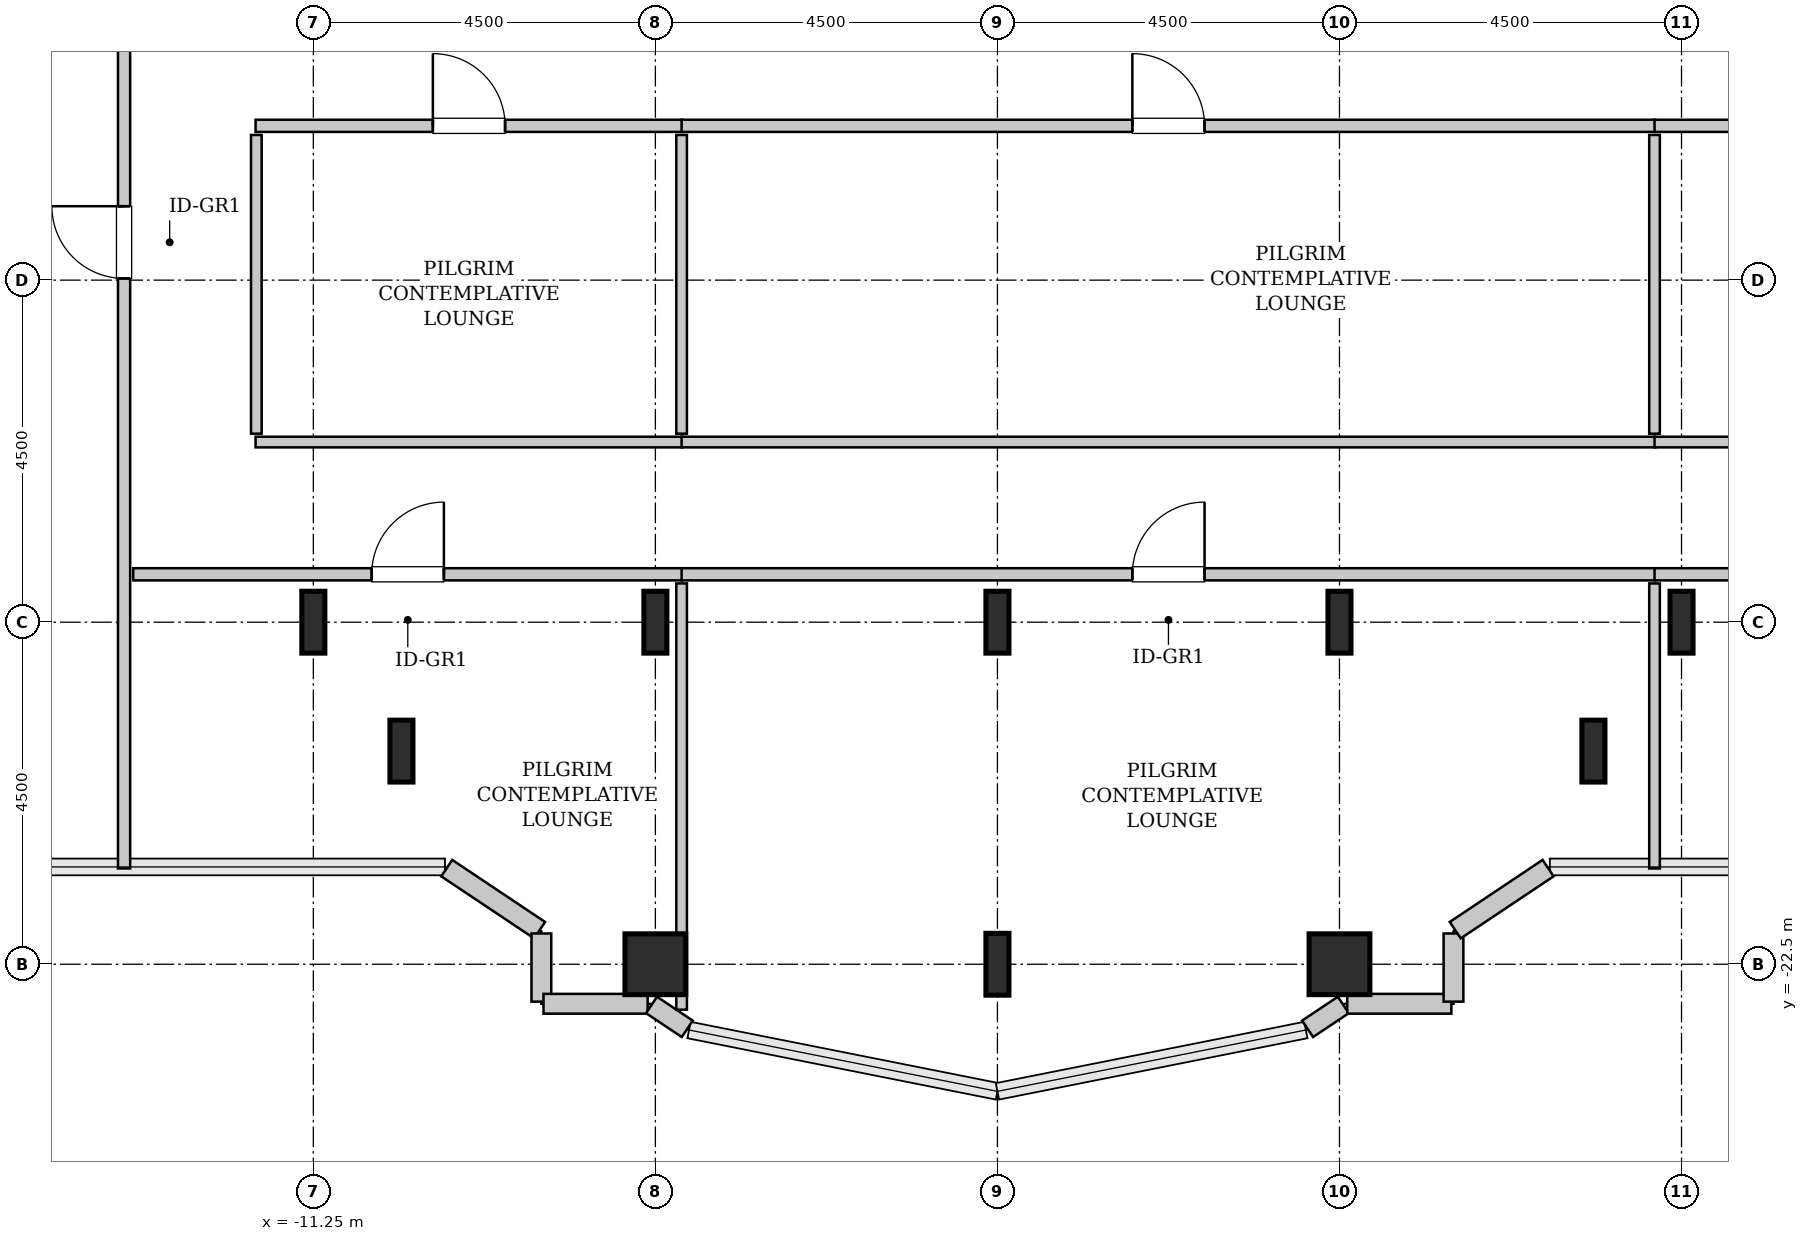
"""IFC4 building model, lengths in metres.
Left out: names, types, materials, properties, quantities, classifications, styles, units other than length and angle.
Written with IfcOpenShell. Run it as: python <this file> out.ifc"""

import sys

from ifc_helpers import new_model, si_unit, direction, frame, frame_2d, origin, origin_2d, place, context, subcontext, project, spatial, rectangle, hollow_rectangle, i_section, extrude, source, transform, mapped, element, fill, save


model = new_model("IFC4")
c1 = context("Model", 3, precision=1e-05, world=origin(), true_north=direction((0.0, 1.0)))
c2 = subcontext(c1, "Body", "Model", "MODEL_VIEW")
j1 = project(units=[si_unit("LENGTHUNIT", "METRE"), si_unit("PLANEANGLEUNIT", "RADIAN")], contexts=[c1])
p1 = place(None, origin())
s1 = spatial("IfcSite", under=j1, at=p1, CompositionType="ELEMENT")
p2 = place(p1, origin())
s2 = spatial("IfcBuilding", under=s1, at=p2, CompositionType="ELEMENT")
p3 = place(p2, frame((0.0, 0.0, 190.6)))
s3 = spatial("IfcBuildingStorey", under=s2, at=p3, CompositionType="ELEMENT", Elevation=190.6)
m1 = source(origin(), c2, "Body", "SweptSolid", [
    extrude(i_section(OverallWidth=0.303, OverallDepth=0.814, WebThickness=0.021, FlangeThickness=0.04, FilletRadius=0.03, at=origin_2d()), origin(), (0.0, 0.0, 1.0), 3.8),
])
for number, where, z_axis, x_axis in (
    (1, (-11.25, -18.0, 0.0), (0.0, 0.0, 1.0), (1.0, 0.0, 0.0)),
    (2, (-10.091, -19.696, 0.0), (0.0, 0.0, 1.0), (1.0, 0.0, 0.0)),
):
    element("IfcColumn", number, at=place(p3, frame(where, z_axis=z_axis, x_axis=x_axis)), inside=s3, PredefinedType="COLUMN", context=c2, shape_type="MappedRepresentation", body=[
        mapped(m1, transform((0.0, 0.0, 0.0), x_axis=(1.0, 0.0, 0.0), y_axis=(0.0, 1.0, 0.0), z_axis=(0.0, 0.0, 1.0), scale=1.0)),
    ])
m2 = source(origin(), c2, "Body", "SweptSolid", [
    extrude(hollow_rectangle(XDim=0.8, YDim=0.8, WallThickness=0.04, InnerFilletRadius=0.04, OuterFilletRadius=0.08, at=origin_2d()), origin(), (0.0, 0.0, 1.0), 3.8),
])
p4 = place(p3, frame((-6.75, -22.5, 0.0), z_axis=(0.0, 0.0, 1.0), x_axis=(1.0, 0.0, 0.0)))
e3 = element("IfcColumn", 3, at=p4, inside=s3, PredefinedType="COLUMN", context=c2, shape_type="MappedRepresentation", body=[
    mapped(m2, transform((0.0, 0.0, 0.0), x_axis=(1.0, 0.0, 0.0), y_axis=(0.0, 1.0, 0.0), z_axis=(0.0, 0.0, 1.0), scale=1.0)),
])
for number, where, z_axis, x_axis in (
    (4, (-6.75, -18.0, 0.0), (0.0, 0.0, 1.0), (1.0, 0.0, 0.0)),
    (5, (-2.25, -22.5, 0.0), (0.0, 0.0, 1.0), (1.0, 0.0, 0.0)),
    (6, (-2.25, -18.0, 0.0), (0.0, 0.0, 1.0), (1.0, 0.0, 0.0)),
):
    element("IfcColumn", number, at=place(p3, frame(where, z_axis=z_axis, x_axis=x_axis)), inside=s3, PredefinedType="COLUMN", context=c2, shape_type="MappedRepresentation", body=[
        mapped(m1, transform((0.0, 0.0, 0.0), x_axis=(1.0, 0.0, 0.0), y_axis=(0.0, 1.0, 0.0), z_axis=(0.0, 0.0, 1.0), scale=1.0)),
    ])
p5 = place(p3, frame((2.25, -22.5, 0.0), z_axis=(0.0, 0.0, 1.0), x_axis=(1.0, 0.0, 0.0)))
e7 = element("IfcColumn", 7, at=p5, inside=s3, PredefinedType="COLUMN", context=c2, shape_type="MappedRepresentation", body=[
    mapped(m2, transform((0.0, 0.0, 0.0), x_axis=(1.0, 0.0, 0.0), y_axis=(0.0, 1.0, 0.0), z_axis=(0.0, 0.0, 1.0), scale=1.0)),
])
for number, where, z_axis, x_axis in (
    (8, (2.25, -18.0, 0.0), (0.0, 0.0, 1.0), (1.0, 0.0, 0.0)),
    (9, (5.591, -19.696, 0.0), (0.0, 0.0, 1.0), (1.0, 0.0, 0.0)),
    (10, (6.75, -18.0, 0.0), (0.0, 0.0, 1.0), (1.0, 0.0, 0.0)),
):
    element("IfcColumn", number, at=place(p3, frame(where, z_axis=z_axis, x_axis=x_axis)), inside=s3, PredefinedType="COLUMN", context=c2, shape_type="MappedRepresentation", body=[
        mapped(m1, transform((0.0, 0.0, 0.0), x_axis=(1.0, 0.0, 0.0), y_axis=(0.0, 1.0, 0.0), z_axis=(0.0, 0.0, 1.0), scale=1.0)),
    ])
m3 = source(origin(), c2, "Body", "SweptSolid", [
    extrude(rectangle(XDim=1.469, YDim=0.26, at=frame_2d((0.734, 0.0))), origin(), (0.0, 0.0, 1.0), 3.55),
])
p6 = place(p3, frame((-9.495, -21.236, 0.0), z_axis=(0.0, 0.0, 1.0), x_axis=(0.831461760506, -0.555581983884, 0.0)))
e11 = element("IfcWall", 11, at=p6, inside=s3, PredefinedType="SOLIDWALL", context=c2, shape_type="MappedRepresentation", body=[
    mapped(m3, transform((0.0, 0.0, 0.0), x_axis=(1.0, 0.0, 0.0), y_axis=(0.0, 1.0, 0.0), z_axis=(0.0, 0.0, 1.0), scale=1.0)),
])
m4 = source(origin(), c2, "Body", "SweptSolid", [
    extrude(rectangle(XDim=0.897, YDim=0.26, at=frame_2d((0.448, 0.0))), origin(), (0.0, 0.0, 1.0), 3.55),
])
p7 = place(p3, frame((-8.25, -22.095, 0.0), z_axis=(0.0, 0.0, 1.0), x_axis=(0.0, -1.0, 0.0)))
e12 = element("IfcWall", 12, at=p7, inside=s3, PredefinedType="SOLIDWALL", context=c2, shape_type="MappedRepresentation", body=[
    mapped(m4, transform((0.0, 0.0, 0.0), x_axis=(1.0, 0.0, 0.0), y_axis=(0.0, 1.0, 0.0), z_axis=(0.0, 0.0, 1.0), scale=1.0)),
])
m5 = source(origin(), c2, "Body", "SweptSolid", [
    extrude(rectangle(XDim=1.37, YDim=0.26, at=frame_2d((0.685, 0.0))), origin(), (0.0, 0.0, 1.0), 3.55),
])
p8 = place(p3, frame((-8.222, -23.02, 0.0), z_axis=(0.0, 0.0, 1.0), x_axis=(1.0, 0.0, 0.0)))
e13 = element("IfcWall", 13, at=p8, inside=s3, PredefinedType="SOLIDWALL", context=c2, shape_type="MappedRepresentation", body=[
    mapped(m5, transform((0.0, 0.0, 0.0), x_axis=(1.0, 0.0, 0.0), y_axis=(0.0, 1.0, 0.0), z_axis=(0.0, 0.0, 1.0), scale=1.0)),
])
m6 = source(origin(), c2, "Body", "SweptSolid", [
    extrude(rectangle(XDim=0.565, YDim=0.26, at=frame_2d((0.283, 0.0))), origin(), (0.0, 0.0, 1.0), 3.55),
])
for number, where, z_axis, x_axis in (
    (14, (-6.801, -23.036, 0.0), (0.0, 0.0, 1.0), (0.832, -0.555, 0.0)),
    (15, (1.831, -23.35, 0.0), (0.0, 0.0, 1.0), (0.832, 0.555, 0.0)),
):
    element("IfcWall", number, at=place(p3, frame(where, z_axis=z_axis, x_axis=x_axis)), inside=s3, PredefinedType="SOLIDWALL", context=c2, shape_type="MappedRepresentation", body=[
        mapped(m6, transform((0.0, 0.0, 0.0), x_axis=(1.0, 0.0, 0.0), y_axis=(0.0, 1.0, 0.0), z_axis=(0.0, 0.0, 1.0), scale=1.0)),
    ])
p9 = place(p3, frame((2.352, -23.02, 0.0), z_axis=(0.0, 0.0, 1.0), x_axis=(1.0, 0.0, 0.0)))
e16 = element("IfcWall", 16, at=p9, inside=s3, PredefinedType="SOLIDWALL", context=c2, shape_type="MappedRepresentation", body=[
    mapped(m5, transform((0.0, 0.0, 0.0), x_axis=(1.0, 0.0, 0.0), y_axis=(0.0, 1.0, 0.0), z_axis=(0.0, 0.0, 1.0), scale=1.0)),
])
p10 = place(p3, frame((3.75, -22.992, 0.0), z_axis=(0.0, 0.0, 1.0), x_axis=(0.0, 1.0, 0.0)))
e17 = element("IfcWall", 17, at=p10, inside=s3, PredefinedType="SOLIDWALL", context=c2, shape_type="MappedRepresentation", body=[
    mapped(m4, transform((0.0, 0.0, 0.0), x_axis=(1.0, 0.0, 0.0), y_axis=(0.0, 1.0, 0.0), z_axis=(0.0, 0.0, 1.0), scale=1.0)),
])
p11 = place(p3, frame((3.773, -22.052, 0.0), z_axis=(0.0, 0.0, 1.0), x_axis=(0.831461760506, 0.555581983884, 0.0)))
e18 = element("IfcWall", 18, at=p11, inside=s3, PredefinedType="SOLIDWALL", context=c2, shape_type="MappedRepresentation", body=[
    mapped(m3, transform((0.0, 0.0, 0.0), x_axis=(1.0, 0.0, 0.0), y_axis=(0.0, 1.0, 0.0), z_axis=(0.0, 0.0, 1.0), scale=1.0)),
])
m7 = source(origin(), c2, "Body", "SweptSolid", [
    extrude(rectangle(XDim=12.645, YDim=0.16, at=frame_2d((6.323, 0.0))), origin(), (0.0, 0.0, 1.0), 3.535),
])
p12 = place(p3, frame((-13.74, -21.24, 0.0), z_axis=(0.0, 0.0, 1.0), x_axis=(0.0, 1.0, 0.0)))
e19 = element("IfcWall", 19, at=p12, inside=s3, PredefinedType="PARTITIONING", context=c2, shape_type="MappedRepresentation", body=[
    mapped(m7, transform((0.0, 0.0, 0.0), x_axis=(1.0, 0.0, 0.0), y_axis=(0.0, 1.0, 0.0), z_axis=(0.0, 0.0, 1.0), scale=1.0)),
])
p13 = place(p12, frame((7.762, 0.0, 0.0)))
e20 = element("IfcOpeningElement", 20, at=p13, cuts=e19, PredefinedType="OPENING", context=c2, shape_type="SweptSolid", body=[
    extrude(rectangle(XDim=0.95, YDim=2.1, at=frame_2d((0.475, 1.05))), frame((0.0, 0.09, 0.0), z_axis=(0.0, -1.0, 0.0), x_axis=(1.0, 0.0, 0.0)), (0.0, 0.0, 1.0), 0.18),
])
m8 = source(origin(), c2, "Body", "SweptSolid", [
    extrude(rectangle(XDim=7.225, YDim=0.16, at=frame_2d((3.613, 0.0))), origin(), (0.0, 0.0, 1.0), 3.535),
])
p14 = place(p3, frame((-13.62, -17.37, 0.0), z_axis=(0.0, 0.0, 1.0), x_axis=(1.0, 0.0, 0.0)))
e21 = element("IfcWall", 21, at=p14, inside=s3, PredefinedType="PARTITIONING", context=c2, shape_type="MappedRepresentation", body=[
    mapped(m8, transform((0.0, 0.0, 0.0), x_axis=(1.0, 0.0, 0.0), y_axis=(0.0, 1.0, 0.0), z_axis=(0.0, 0.0, 1.0), scale=1.0)),
])
p15 = place(p14, frame((3.137, 0.0, 0.0)))
e22 = element("IfcOpeningElement", 22, at=p15, cuts=e21, PredefinedType="OPENING", context=c2, shape_type="SweptSolid", body=[
    extrude(rectangle(XDim=0.95, YDim=2.1, at=frame_2d((0.475, 1.05))), frame((0.0, 0.09, 0.0), z_axis=(0.0, -1.0, 0.0), x_axis=(1.0, 0.0, 0.0)), (0.0, 0.0, 1.0), 0.18),
])
m9 = source(origin(), c2, "Body", "SweptSolid", [
    extrude(rectangle(XDim=5.608, YDim=0.14, at=frame_2d((2.804, 0.0))), origin(), (0.0, 0.0, 1.0), 2.875),
])
p16 = place(p3, frame((-6.405, -23.098, 0.0), z_axis=(0.0, 0.0, 1.0), x_axis=(0.0, 1.0, 0.0)))
e23 = element("IfcWall", 23, at=p16, inside=s3, PredefinedType="PARTITIONING", context=c2, shape_type="MappedRepresentation", body=[
    mapped(m9, transform((0.0, 0.0, 0.0), x_axis=(1.0, 0.0, 0.0), y_axis=(0.0, 1.0, 0.0), z_axis=(0.0, 0.0, 1.0), scale=1.0)),
])
m10 = source(origin(), c2, "Body", "SweptSolid", [
    extrude(rectangle(XDim=5.615, YDim=0.16, at=frame_2d((2.808, 0.0))), origin(), (0.0, 0.0, 1.0), 3.535),
])
p17 = place(p3, frame((-12.01, -11.47, 0.0), z_axis=(0.0, 0.0, 1.0), x_axis=(1.0, 0.0, 0.0)))
e24 = element("IfcWall", 24, at=p17, inside=s3, PredefinedType="PARTITIONING", context=c2, shape_type="MappedRepresentation", body=[
    mapped(m10, transform((0.0, 0.0, 0.0), x_axis=(1.0, 0.0, 0.0), y_axis=(0.0, 1.0, 0.0), z_axis=(0.0, 0.0, 1.0), scale=1.0)),
])
p18 = place(p17, frame((2.333, 0.0, 0.0)))
e25 = element("IfcOpeningElement", 25, at=p18, cuts=e24, PredefinedType="OPENING", context=c2, shape_type="SweptSolid", body=[
    extrude(rectangle(XDim=0.95, YDim=2.1, at=frame_2d((0.475, 1.05))), frame((0.0, 0.09, 0.0), z_axis=(0.0, -1.0, 0.0), x_axis=(1.0, 0.0, 0.0)), (0.0, 0.0, 1.0), 0.18),
])
m11 = source(origin(), c2, "Body", "SweptSolid", [
    extrude(rectangle(XDim=5.615, YDim=0.14, at=frame_2d((2.808, 0.0))), origin(), (0.0, 0.0, 1.0), 3.535),
])
p19 = place(p3, frame((-12.01, -15.63, 0.0), z_axis=(0.0, 0.0, 1.0), x_axis=(1.0, 0.0, 0.0)))
e26 = element("IfcWall", 26, at=p19, inside=s3, PredefinedType="PARTITIONING", context=c2, shape_type="MappedRepresentation", body=[
    mapped(m11, transform((0.0, 0.0, 0.0), x_axis=(1.0, 0.0, 0.0), y_axis=(0.0, 1.0, 0.0), z_axis=(0.0, 0.0, 1.0), scale=1.0)),
])
m12 = source(origin(), c2, "Body", "SweptSolid", [
    extrude(rectangle(XDim=3.93, YDim=0.14, at=frame_2d((1.965, 0.0))), origin(), (0.0, 0.0, 1.0), 3.535),
])
for number, where, z_axis, x_axis in (
    (27, (-12.0, -15.52, 0.0), (0.0, 0.0, 1.0), (0.0, 1.0, 0.0)),
    (28, (-6.405, -15.52, 0.0), (0.0, 0.0, 1.0), (0.0, 1.0, 0.0)),
):
    element("IfcWall", number, at=place(p3, frame(where, z_axis=z_axis, x_axis=x_axis)), inside=s3, PredefinedType="PARTITIONING", context=c2, shape_type="MappedRepresentation", body=[
        mapped(m12, transform((0.0, 0.0, 0.0), x_axis=(1.0, 0.0, 0.0), y_axis=(0.0, 1.0, 0.0), z_axis=(0.0, 0.0, 1.0), scale=1.0)),
    ])
m13 = source(origin(), c2, "Body", "SweptSolid", [
    extrude(rectangle(XDim=12.81, YDim=0.16, at=frame_2d((6.405, 0.0))), origin(), (0.0, 0.0, 1.0), 3.535),
])
p20 = place(p3, frame((-6.405, -17.37, 0.0), z_axis=(0.0, 0.0, 1.0), x_axis=(1.0, 0.0, 0.0)))
e29 = element("IfcWall", 29, at=p20, inside=s3, PredefinedType="PARTITIONING", context=c2, shape_type="MappedRepresentation", body=[
    mapped(m13, transform((0.0, 0.0, 0.0), x_axis=(1.0, 0.0, 0.0), y_axis=(0.0, 1.0, 0.0), z_axis=(0.0, 0.0, 1.0), scale=1.0)),
])
p21 = place(p20, frame((5.93, 0.0, 0.0)))
e30 = element("IfcOpeningElement", 30, at=p21, cuts=e29, PredefinedType="OPENING", context=c2, shape_type="SweptSolid", body=[
    extrude(rectangle(XDim=0.95, YDim=2.1, at=frame_2d((0.475, 1.05))), frame((0.0, 0.09, 0.0), z_axis=(0.0, -1.0, 0.0), x_axis=(1.0, 0.0, 0.0)), (0.0, 0.0, 1.0), 0.18),
])
m14 = source(origin(), c2, "Body", "SweptSolid", [
    extrude(rectangle(XDim=3.75, YDim=0.14, at=frame_2d((1.875, 0.0))), origin(), (0.0, 0.0, 1.0), 3.535),
])
p22 = place(p3, frame((6.395, -21.24, 0.0), z_axis=(0.0, 0.0, 1.0), x_axis=(0.0, 1.0, 0.0)))
e31 = element("IfcWall", 31, at=p22, inside=s3, PredefinedType="PARTITIONING", context=c2, shape_type="MappedRepresentation", body=[
    mapped(m14, transform((0.0, 0.0, 0.0), x_axis=(1.0, 0.0, 0.0), y_axis=(0.0, 1.0, 0.0), z_axis=(0.0, 0.0, 1.0), scale=1.0)),
])
p23 = place(p3, frame((-6.405, -11.47, 0.0), z_axis=(0.0, 0.0, 1.0), x_axis=(1.0, 0.0, 0.0)))
e32 = element("IfcWall", 32, at=p23, inside=s3, PredefinedType="PARTITIONING", context=c2, shape_type="MappedRepresentation", body=[
    mapped(m13, transform((0.0, 0.0, 0.0), x_axis=(1.0, 0.0, 0.0), y_axis=(0.0, 1.0, 0.0), z_axis=(0.0, 0.0, 1.0), scale=1.0)),
])
p24 = place(p23, frame((5.93, 0.0, 0.0)))
e33 = element("IfcOpeningElement", 33, at=p24, cuts=e32, PredefinedType="OPENING", context=c2, shape_type="SweptSolid", body=[
    extrude(rectangle(XDim=0.95, YDim=2.1, at=frame_2d((0.475, 1.05))), frame((0.0, 0.09, 0.0), z_axis=(0.0, -1.0, 0.0), x_axis=(1.0, 0.0, 0.0)), (0.0, 0.0, 1.0), 0.18),
])
m15 = source(origin(), c2, "Body", "SweptSolid", [
    extrude(rectangle(XDim=12.81, YDim=0.14, at=frame_2d((6.405, 0.0))), origin(), (0.0, 0.0, 1.0), 3.535),
])
p25 = place(p3, frame((-6.405, -15.63, 0.0), z_axis=(0.0, 0.0, 1.0), x_axis=(1.0, 0.0, 0.0)))
e34 = element("IfcWall", 34, at=p25, inside=s3, PredefinedType="PARTITIONING", context=c2, shape_type="MappedRepresentation", body=[
    mapped(m15, transform((0.0, 0.0, 0.0), x_axis=(1.0, 0.0, 0.0), y_axis=(0.0, 1.0, 0.0), z_axis=(0.0, 0.0, 1.0), scale=1.0)),
])
p26 = place(p3, frame((6.395, -15.52, 0.0), z_axis=(0.0, 0.0, 1.0), x_axis=(0.0, 1.0, 0.0)))
e35 = element("IfcWall", 35, at=p26, inside=s3, PredefinedType="PARTITIONING", context=c2, shape_type="MappedRepresentation", body=[
    mapped(m12, transform((0.0, 0.0, 0.0), x_axis=(1.0, 0.0, 0.0), y_axis=(0.0, 1.0, 0.0), z_axis=(0.0, 0.0, 1.0), scale=1.0)),
])
p27 = place(p3, frame((6.395, -17.37, 0.0), z_axis=(0.0, 0.0, 1.0), x_axis=(1.0, 0.0, 0.0)))
e36 = element("IfcWall", 36, at=p27, inside=s3, PredefinedType="PARTITIONING", context=c2, shape_type="MappedRepresentation", body=[
    mapped(m8, transform((0.0, 0.0, 0.0), x_axis=(1.0, 0.0, 0.0), y_axis=(0.0, 1.0, 0.0), z_axis=(0.0, 0.0, 1.0), scale=1.0)),
])
p28 = place(p27, frame((3.137, 0.0, 0.0)))
e37 = element("IfcOpeningElement", 37, at=p28, cuts=e36, PredefinedType="OPENING", context=c2, shape_type="SweptSolid", body=[
    extrude(rectangle(XDim=0.95, YDim=2.1, at=frame_2d((0.475, 1.05))), frame((0.0, 0.09, 0.0), z_axis=(0.0, -1.0, 0.0), x_axis=(1.0, 0.0, 0.0)), (0.0, 0.0, 1.0), 0.18),
])
p29 = place(p3, frame((6.395, -11.47, 0.0), z_axis=(0.0, 0.0, 1.0), x_axis=(1.0, 0.0, 0.0)))
e38 = element("IfcWall", 38, at=p29, inside=s3, PredefinedType="PARTITIONING", context=c2, shape_type="MappedRepresentation", body=[
    mapped(m10, transform((0.0, 0.0, 0.0), x_axis=(1.0, 0.0, 0.0), y_axis=(0.0, 1.0, 0.0), z_axis=(0.0, 0.0, 1.0), scale=1.0)),
])
p30 = place(p29, frame((2.333, 0.0, 0.0)))
e39 = element("IfcOpeningElement", 39, at=p30, cuts=e38, PredefinedType="OPENING", context=c2, shape_type="SweptSolid", body=[
    extrude(rectangle(XDim=0.95, YDim=2.1, at=frame_2d((0.475, 1.05))), frame((0.0, 0.09, 0.0), z_axis=(0.0, -1.0, 0.0), x_axis=(1.0, 0.0, 0.0)), (0.0, 0.0, 1.0), 0.18),
])
p31 = place(p3, frame((6.395, -15.63, 0.0), z_axis=(0.0, 0.0, 1.0), x_axis=(1.0, 0.0, 0.0)))
e40 = element("IfcWall", 40, at=p31, inside=s3, PredefinedType="PARTITIONING", context=c2, shape_type="MappedRepresentation", body=[
    mapped(m11, transform((0.0, 0.0, 0.0), x_axis=(1.0, 0.0, 0.0), y_axis=(0.0, 1.0, 0.0), z_axis=(0.0, 0.0, 1.0), scale=1.0)),
])
m16 = source(origin(), c2, "Body", "SweptSolid", [
    extrude(rectangle(XDim=0.95, YDim=2.1, at=frame_2d((0.475, 1.05))), frame((0.0, 0.025, 0.0), z_axis=(0.0, -1.0, 0.0), x_axis=(1.0, 0.0, 0.0)), (0.0, 0.0, 1.0), 0.05),
])
p32 = place(p13, origin())
e41 = element("IfcDoor", 41, at=p32, inside=s3, OperationType="SINGLE_SWING_RIGHT", PredefinedType="DOOR", context=c2, shape_type="MappedRepresentation", body=[
    mapped(m16, transform((0.0, 0.0, 0.0), x_axis=(1.0, 0.0, 0.0), y_axis=(0.0, 1.0, 0.0), z_axis=(0.0, 0.0, 1.0), scale=1.0)),
])
fill(e20, e41)
p33 = place(p15, origin())
e42 = element("IfcDoor", 42, at=p33, inside=s3, OperationType="SINGLE_SWING_RIGHT", PredefinedType="DOOR", context=c2, shape_type="MappedRepresentation", body=[
    mapped(m16, transform((0.0, 0.0, 0.0), x_axis=(1.0, 0.0, 0.0), y_axis=(0.0, 1.0, 0.0), z_axis=(0.0, 0.0, 1.0), scale=1.0)),
])
fill(e22, e42)
p34 = place(p18, origin())
e43 = element("IfcDoor", 43, at=p34, inside=s3, OperationType="SINGLE_SWING_LEFT", PredefinedType="DOOR", context=c2, shape_type="MappedRepresentation", body=[
    mapped(m16, transform((0.0, 0.0, 0.0), x_axis=(1.0, 0.0, 0.0), y_axis=(0.0, 1.0, 0.0), z_axis=(0.0, 0.0, 1.0), scale=1.0)),
])
fill(e25, e43)
p35 = place(p21, origin())
e44 = element("IfcDoor", 44, at=p35, inside=s3, OperationType="SINGLE_SWING_RIGHT", PredefinedType="DOOR", context=c2, shape_type="MappedRepresentation", body=[
    mapped(m16, transform((0.0, 0.0, 0.0), x_axis=(1.0, 0.0, 0.0), y_axis=(0.0, 1.0, 0.0), z_axis=(0.0, 0.0, 1.0), scale=1.0)),
])
fill(e30, e44)
p36 = place(p24, origin())
e45 = element("IfcDoor", 45, at=p36, inside=s3, OperationType="SINGLE_SWING_LEFT", PredefinedType="DOOR", context=c2, shape_type="MappedRepresentation", body=[
    mapped(m16, transform((0.0, 0.0, 0.0), x_axis=(1.0, 0.0, 0.0), y_axis=(0.0, 1.0, 0.0), z_axis=(0.0, 0.0, 1.0), scale=1.0)),
])
fill(e33, e45)
save(model, sys.argv[1])
